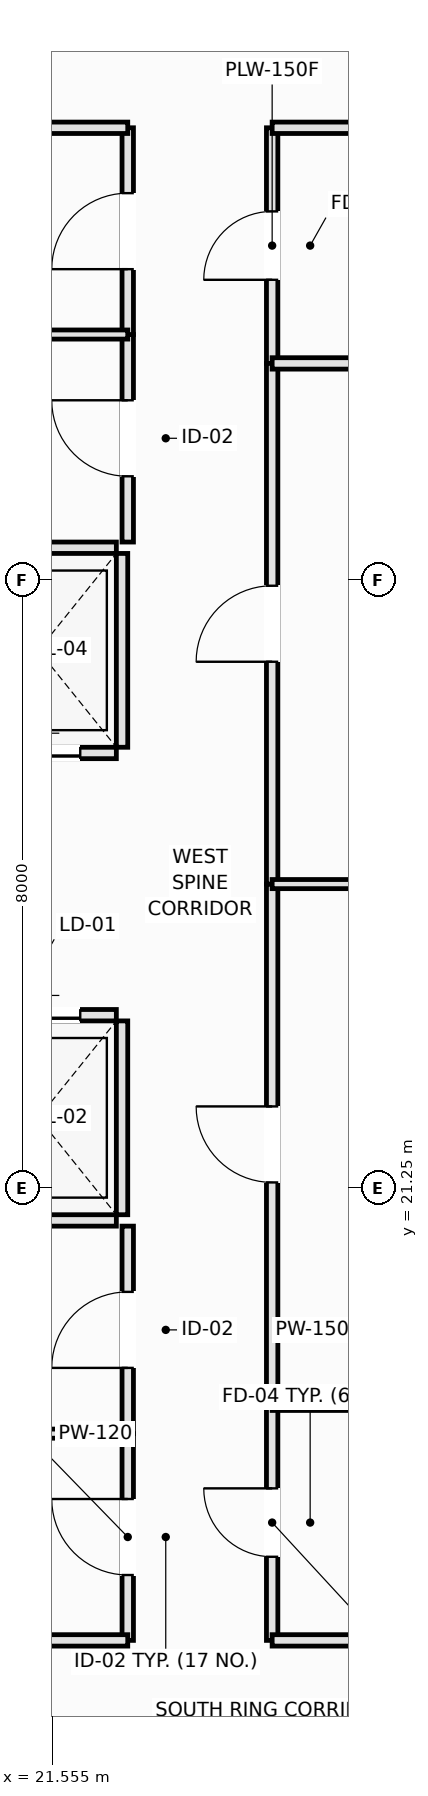
"""IFC4 building model, lengths in metres.
Left out: names, types, materials, properties, quantities, classifications, styles, units other than length and angle.
Written with IfcOpenShell. Run it as: python <this file> out.ifc"""

import sys

from ifc_helpers import new_model, si_unit, direction, frame, frame_2d, origin, place, context, subcontext, project, spatial, rectangle, extrude, element, fill, save


model = new_model("IFC4")
c1 = context("Model", 3, precision=1e-05, world=origin(), true_north=direction((0.0, 1.0)))
c2 = subcontext(c1, "Body", "Model", "MODEL_VIEW")
j1 = project(units=[si_unit("LENGTHUNIT", "METRE"), si_unit("PLANEANGLEUNIT", "RADIAN")], contexts=[c1])
p1 = place(None, origin())
s1 = spatial("IfcSite", under=j1, at=p1, CompositionType="ELEMENT")
p2 = place(p1, origin())
s2 = spatial("IfcBuilding", under=s1, at=p2, CompositionType="ELEMENT")
p3 = place(p2, frame((0.0, 0.0, 46.9)))
s3 = spatial("IfcBuildingStorey", under=s2, at=p3, CompositionType="ELEMENT", Elevation=46.9)
p4 = place(p3, frame((20.35, 20.825, 0.0), z_axis=(0.0, 0.0, 1.0), x_axis=(1.0, 0.0, 0.0)))
e1 = element("IfcWall", 1, at=p4, inside=s3, PredefinedType="PARTITIONING", context=c2, shape_type="SweptSolid", body=[
    extrude(rectangle(XDim=2.05, YDim=0.15, at=frame_2d((1.025, 0.0))), origin(), (0.0, 0.0, 1.0), 3.37),
])
p5 = place(p3, frame((20.35, 23.525, 0.0), z_axis=(0.0, 0.0, 1.0), x_axis=(1.0, 0.0, 0.0)))
e2 = element("IfcWall", 2, at=p5, inside=s3, PredefinedType="PARTITIONING", context=c2, shape_type="SweptSolid", body=[
    extrude(rectangle(XDim=2.05, YDim=0.15, at=frame_2d((1.025, 0.0))), origin(), (0.0, 0.0, 1.0), 3.37),
])
p6 = place(p5, frame((0.475, 0.0, 0.0)))
e3 = element("IfcOpeningElement", 3, at=p6, cuts=e2, PredefinedType="OPENING", context=c2, shape_type="SweptSolid", body=[
    extrude(rectangle(XDim=1.1, YDim=2.2, at=frame_2d((0.55, 1.1))), frame((0.0, 0.085, 0.0), z_axis=(0.0, -1.0, 0.0), x_axis=(1.0, 0.0, 0.0)), (0.0, 0.0, 1.0), 0.17),
])
p7 = place(p3, frame((22.475, 20.9, 0.0), z_axis=(0.0, 0.0, 1.0), x_axis=(0.0, 1.0, 0.0)))
e4 = element("IfcWall", 4, at=p7, inside=s3, PredefinedType="PARTITIONING", context=c2, shape_type="SweptSolid", body=[
    extrude(rectangle(XDim=2.55, YDim=0.15, at=frame_2d((1.275, 0.0))), origin(), (0.0, 0.0, 1.0), 3.37),
])
p8 = place(p3, frame((20.35, 26.975, 0.0), z_axis=(0.0, 0.0, 1.0), x_axis=(1.0, 0.0, 0.0)))
e5 = element("IfcWall", 5, at=p8, inside=s3, PredefinedType="PARTITIONING", context=c2, shape_type="SweptSolid", body=[
    extrude(rectangle(XDim=2.05, YDim=0.15, at=frame_2d((1.025, 0.0))), origin(), (0.0, 0.0, 1.0), 3.37),
])
p9 = place(p8, frame((0.475, 0.0, 0.0)))
e6 = element("IfcOpeningElement", 6, at=p9, cuts=e5, PredefinedType="OPENING", context=c2, shape_type="SweptSolid", body=[
    extrude(rectangle(XDim=1.1, YDim=2.2, at=frame_2d((0.55, 1.1))), frame((0.0, 0.085, 0.0), z_axis=(0.0, -1.0, 0.0), x_axis=(1.0, 0.0, 0.0)), (0.0, 0.0, 1.0), 0.17),
])
p10 = place(p3, frame((20.35, 29.675, 0.0), z_axis=(0.0, 0.0, 1.0), x_axis=(1.0, 0.0, 0.0)))
e7 = element("IfcWall", 7, at=p10, inside=s3, PredefinedType="PARTITIONING", context=c2, shape_type="SweptSolid", body=[
    extrude(rectangle(XDim=2.05, YDim=0.15, at=frame_2d((1.025, 0.0))), origin(), (0.0, 0.0, 1.0), 3.37),
])
p11 = place(p3, frame((22.475, 27.05, 0.0), z_axis=(0.0, 0.0, 1.0), x_axis=(0.0, 1.0, 0.0)))
e8 = element("IfcWall", 8, at=p11, inside=s3, PredefinedType="PARTITIONING", context=c2, shape_type="SweptSolid", body=[
    extrude(rectangle(XDim=2.55, YDim=0.15, at=frame_2d((1.275, 0.0))), origin(), (0.0, 0.0, 1.0), 3.37),
])
p12 = place(p3, frame((22.55, 15.3, 0.0), z_axis=(0.0, 0.0, 1.0), x_axis=(0.0, 1.0, 0.0)))
e9 = element("IfcWall", 9, at=p12, inside=s3, PredefinedType="PARTITIONING", context=c2, shape_type="SweptSolid", body=[
    extrude(rectangle(XDim=2.72, YDim=0.15, at=frame_2d((1.36, 0.0))), origin(), (0.0, 0.0, 1.0), 3.01),
])
p13 = place(p12, frame((0.86, 0.0, 0.0)))
e10 = element("IfcOpeningElement", 10, at=p13, cuts=e9, PredefinedType="OPENING", context=c2, shape_type="SweptSolid", body=[
    extrude(rectangle(XDim=1.0, YDim=2.15, at=frame_2d((0.5, 1.075))), frame((0.0, 0.085, 0.0), z_axis=(0.0, -1.0, 0.0), x_axis=(1.0, 0.0, 0.0)), (0.0, 0.0, 1.0), 0.17),
])
p14 = place(p3, frame((22.55, 18.02, 0.0), z_axis=(0.0, 0.0, 1.0), x_axis=(0.0, 1.0, 0.0)))
e11 = element("IfcWall", 11, at=p14, inside=s3, PredefinedType="PARTITIONING", context=c2, shape_type="SweptSolid", body=[
    extrude(rectangle(XDim=2.73, YDim=0.15, at=frame_2d((1.365, 0.0))), origin(), (0.0, 0.0, 1.0), 3.01),
])
p15 = place(p14, frame((0.865, 0.0, 0.0)))
e12 = element("IfcOpeningElement", 12, at=p15, cuts=e11, PredefinedType="OPENING", context=c2, shape_type="SweptSolid", body=[
    extrude(rectangle(XDim=1.0, YDim=2.15, at=frame_2d((0.5, 1.075))), frame((0.0, 0.085, 0.0), z_axis=(0.0, -1.0, 0.0), x_axis=(1.0, 0.0, 0.0)), (0.0, 0.0, 1.0), 0.17),
])
p16 = place(p3, frame((22.55, 29.75, 0.0), z_axis=(0.0, 0.0, 1.0), x_axis=(0.0, 1.0, 0.0)))
e13 = element("IfcWall", 13, at=p16, inside=s3, PredefinedType="PARTITIONING", context=c2, shape_type="SweptSolid", body=[
    extrude(rectangle(XDim=2.73, YDim=0.15, at=frame_2d((1.365, 0.0))), origin(), (0.0, 0.0, 1.0), 3.01),
])
p17 = place(p16, frame((0.865, 0.0, 0.0)))
e14 = element("IfcOpeningElement", 14, at=p17, cuts=e13, PredefinedType="OPENING", context=c2, shape_type="SweptSolid", body=[
    extrude(rectangle(XDim=1.0, YDim=2.15, at=frame_2d((0.5, 1.075))), frame((0.0, 0.085, 0.0), z_axis=(0.0, -1.0, 0.0), x_axis=(1.0, 0.0, 0.0)), (0.0, 0.0, 1.0), 0.17),
])
p18 = place(p3, frame((22.55, 32.48, 0.0), z_axis=(0.0, 0.0, 1.0), x_axis=(0.0, 1.0, 0.0)))
e15 = element("IfcWall", 15, at=p18, inside=s3, PredefinedType="PARTITIONING", context=c2, shape_type="SweptSolid", body=[
    extrude(rectangle(XDim=2.72, YDim=0.15, at=frame_2d((1.36, 0.0))), origin(), (0.0, 0.0, 1.0), 3.01),
])
p19 = place(p18, frame((0.86, 0.0, 0.0)))
e16 = element("IfcOpeningElement", 16, at=p19, cuts=e15, PredefinedType="OPENING", context=c2, shape_type="SweptSolid", body=[
    extrude(rectangle(XDim=1.0, YDim=2.15, at=frame_2d((0.5, 1.075))), frame((0.0, 0.085, 0.0), z_axis=(0.0, -1.0, 0.0), x_axis=(1.0, 0.0, 0.0)), (0.0, 0.0, 1.0), 0.17),
])
p20 = place(p3, frame((24.45, 15.3, 0.0), z_axis=(0.0, 0.0, 1.0), x_axis=(0.0, 1.0, 0.0)))
e17 = element("IfcWall", 17, at=p20, inside=s3, PredefinedType="PLUMBINGWALL", context=c2, shape_type="SweptSolid", body=[
    extrude(rectangle(XDim=3.1, YDim=0.15, at=frame_2d((1.55, 0.0))), origin(), (0.0, 0.0, 1.0), 3.37),
])
p21 = place(p20, frame((1.1, 0.0, 0.0)))
e18 = element("IfcOpeningElement", 18, at=p21, cuts=e17, PredefinedType="OPENING", context=c2, shape_type="SweptSolid", body=[
    extrude(rectangle(XDim=0.9, YDim=2.1, at=frame_2d((0.45, 1.05))), frame((0.0, 0.085, 0.0), z_axis=(0.0, -1.0, 0.0), x_axis=(1.0, 0.0, 0.0)), (0.0, 0.0, 1.0), 0.17),
])
p22 = place(p3, frame((24.45, 32.1, 0.0), z_axis=(0.0, 0.0, 1.0), x_axis=(0.0, 1.0, 0.0)))
e19 = element("IfcWall", 19, at=p22, inside=s3, PredefinedType="PLUMBINGWALL", context=c2, shape_type="SweptSolid", body=[
    extrude(rectangle(XDim=3.1, YDim=0.15, at=frame_2d((1.55, 0.0))), origin(), (0.0, 0.0, 1.0), 3.37),
])
p23 = place(p22, frame((1.1, 0.0, 0.0)))
e20 = element("IfcOpeningElement", 20, at=p23, cuts=e19, PredefinedType="OPENING", context=c2, shape_type="SweptSolid", body=[
    extrude(rectangle(XDim=0.9, YDim=2.1, at=frame_2d((0.45, 1.05))), frame((0.0, 0.085, 0.0), z_axis=(0.0, -1.0, 0.0), x_axis=(1.0, 0.0, 0.0)), (0.0, 0.0, 1.0), 0.17),
])
p24 = place(p3, frame((24.45, 18.4, 0.0), z_axis=(0.0, 0.0, 1.0), x_axis=(0.0, 1.0, 0.0)))
e21 = element("IfcWall", 21, at=p24, inside=s3, PredefinedType="PARTITIONING", context=c2, shape_type="SweptSolid", body=[
    extrude(rectangle(XDim=6.85, YDim=0.15, at=frame_2d((3.425, 0.0))), origin(), (0.0, 0.0, 1.0), 3.37),
])
p25 = place(p24, frame((2.925, 0.0, 0.0)))
e22 = element("IfcOpeningElement", 22, at=p25, cuts=e21, PredefinedType="OPENING", context=c2, shape_type="SweptSolid", body=[
    extrude(rectangle(XDim=1.0, YDim=2.15, at=frame_2d((0.5, 1.075))), frame((0.0, 0.085, 0.0), z_axis=(0.0, -1.0, 0.0), x_axis=(1.0, 0.0, 0.0)), (0.0, 0.0, 1.0), 0.17),
])
p26 = place(p3, frame((24.45, 25.25, 0.0), z_axis=(0.0, 0.0, 1.0), x_axis=(0.0, 1.0, 0.0)))
e23 = element("IfcWall", 23, at=p26, inside=s3, PredefinedType="PARTITIONING", context=c2, shape_type="SweptSolid", body=[
    extrude(rectangle(XDim=6.85, YDim=0.15, at=frame_2d((3.425, 0.0))), origin(), (0.0, 0.0, 1.0), 3.37),
])
p27 = place(p26, frame((2.925, 0.0, 0.0)))
e24 = element("IfcOpeningElement", 24, at=p27, cuts=e23, PredefinedType="OPENING", context=c2, shape_type="SweptSolid", body=[
    extrude(rectangle(XDim=1.0, YDim=2.15, at=frame_2d((0.5, 1.075))), frame((0.0, 0.085, 0.0), z_axis=(0.0, -1.0, 0.0), x_axis=(1.0, 0.0, 0.0)), (0.0, 0.0, 1.0), 0.17),
])
p28 = place(p3, frame((19.9, 15.3, 0.0), z_axis=(0.0, 0.0, 1.0), x_axis=(1.0, 0.0, 0.0)))
e25 = element("IfcWall", 25, at=p28, inside=s3, PredefinedType="PARTITIONING", context=c2, shape_type="SweptSolid", body=[
    extrude(rectangle(XDim=2.65, YDim=0.15, at=frame_2d((1.325, 0.0))), origin(), (0.0, 0.0, 1.0), 3.37),
])
p29 = place(p3, frame((24.45, 15.3, 0.0), z_axis=(0.0, 0.0, 1.0), x_axis=(1.0, 0.0, 0.0)))
e26 = element("IfcWall", 26, at=p29, inside=s3, PredefinedType="PLUMBINGWALL", context=c2, shape_type="SweptSolid", body=[
    extrude(rectangle(XDim=3.15, YDim=0.15, at=frame_2d((1.575, 0.0))), origin(), (0.0, 0.0, 1.0), 3.37),
])
p30 = place(p3, frame((19.9, 35.2, 0.0), z_axis=(0.0, 0.0, 1.0), x_axis=(1.0, 0.0, 0.0)))
e27 = element("IfcWall", 27, at=p30, inside=s3, PredefinedType="PARTITIONING", context=c2, shape_type="SweptSolid", body=[
    extrude(rectangle(XDim=2.65, YDim=0.15, at=frame_2d((1.325, 0.0))), origin(), (0.0, 0.0, 1.0), 3.37),
])
p31 = place(p3, frame((24.45, 35.2, 0.0), z_axis=(0.0, 0.0, 1.0), x_axis=(1.0, 0.0, 0.0)))
e28 = element("IfcWall", 28, at=p31, inside=s3, PredefinedType="PLUMBINGWALL", context=c2, shape_type="SweptSolid", body=[
    extrude(rectangle(XDim=3.15, YDim=0.15, at=frame_2d((1.575, 0.0))), origin(), (0.0, 0.0, 1.0), 3.37),
])
for number, where, z_axis, x_axis in (
    (29, (19.9, 18.02, 0.0), (0.0, 0.0, 1.0), (1.0, 0.0, 0.0)),
    (30, (19.9, 32.48, 0.0), (0.0, 0.0, 1.0), (1.0, 0.0, 0.0)),
):
    element("IfcWall", number, at=place(p3, frame(where, z_axis=z_axis, x_axis=x_axis)), inside=s3, PredefinedType="PARTITIONING", context=c2, shape_type="SweptSolid", body=[
        extrude(rectangle(XDim=2.65, YDim=0.12, at=frame_2d((1.325, 0.0))), origin(), (0.0, 0.0, 1.0), 3.37),
    ])
for number, where, z_axis, x_axis in (
    (31, (24.45, 18.4, 0.0), (0.0, 0.0, 1.0), (1.0, 0.0, 0.0)),
    (32, (24.45, 32.1, 0.0), (0.0, 0.0, 1.0), (1.0, 0.0, 0.0)),
):
    element("IfcWall", number, at=place(p3, frame(where, z_axis=z_axis, x_axis=x_axis)), inside=s3, PredefinedType="PLUMBINGWALL", context=c2, shape_type="SweptSolid", body=[
        extrude(rectangle(XDim=3.15, YDim=0.15, at=frame_2d((1.575, 0.0))), origin(), (0.0, 0.0, 1.0), 2.72),
    ])
p32 = place(p3, frame((24.45, 25.25, 0.0), z_axis=(0.0, 0.0, 1.0), x_axis=(1.0, 0.0, 0.0)))
e33 = element("IfcWall", 33, at=p32, inside=s3, PredefinedType="PARTITIONING", context=c2, shape_type="SweptSolid", body=[
    extrude(rectangle(XDim=13.75, YDim=0.12, at=frame_2d((6.875, 0.0))), origin(), (0.0, 0.0, 1.0), 2.72),
])
p33 = place(p6, origin())
e34 = element("IfcDoor", 34, at=p33, inside=s3, OperationType="DOUBLE_DOOR_SLIDING", PredefinedType="DOOR", context=c2, shape_type="SweptSolid", body=[
    extrude(rectangle(XDim=1.1, YDim=2.2, at=frame_2d((0.55, 1.1))), frame((0.0, 0.025, 0.0), z_axis=(0.0, -1.0, 0.0), x_axis=(1.0, 0.0, 0.0)), (0.0, 0.0, 1.0), 0.05),
])
fill(e3, e34)
p34 = place(p9, origin())
e35 = element("IfcDoor", 35, at=p34, inside=s3, OperationType="DOUBLE_DOOR_SLIDING", PredefinedType="DOOR", context=c2, shape_type="SweptSolid", body=[
    extrude(rectangle(XDim=1.1, YDim=2.2, at=frame_2d((0.55, 1.1))), frame((0.0, 0.025, 0.0), z_axis=(0.0, -1.0, 0.0), x_axis=(1.0, 0.0, 0.0)), (0.0, 0.0, 1.0), 0.05),
])
fill(e6, e35)
p35 = place(p13, origin())
e36 = element("IfcDoor", 36, at=p35, inside=s3, OperationType="SINGLE_SWING_RIGHT", PredefinedType="DOOR", context=c2, shape_type="SweptSolid", body=[
    extrude(rectangle(XDim=1.0, YDim=2.15, at=frame_2d((0.5, 1.075))), frame((0.0, 0.025, 0.0), z_axis=(0.0, -1.0, 0.0), x_axis=(1.0, 0.0, 0.0)), (0.0, 0.0, 1.0), 0.05),
])
fill(e10, e36)
p36 = place(p15, origin())
e37 = element("IfcDoor", 37, at=p36, inside=s3, OperationType="SINGLE_SWING_LEFT", PredefinedType="DOOR", context=c2, shape_type="SweptSolid", body=[
    extrude(rectangle(XDim=1.0, YDim=2.15, at=frame_2d((0.5, 1.075))), frame((0.0, 0.025, 0.0), z_axis=(0.0, -1.0, 0.0), x_axis=(1.0, 0.0, 0.0)), (0.0, 0.0, 1.0), 0.05),
])
fill(e12, e37)
p37 = place(p17, origin())
e38 = element("IfcDoor", 38, at=p37, inside=s3, OperationType="SINGLE_SWING_RIGHT", PredefinedType="DOOR", context=c2, shape_type="SweptSolid", body=[
    extrude(rectangle(XDim=1.0, YDim=2.15, at=frame_2d((0.5, 1.075))), frame((0.0, 0.025, 0.0), z_axis=(0.0, -1.0, 0.0), x_axis=(1.0, 0.0, 0.0)), (0.0, 0.0, 1.0), 0.05),
])
fill(e14, e38)
p38 = place(p19, origin())
e39 = element("IfcDoor", 39, at=p38, inside=s3, OperationType="SINGLE_SWING_LEFT", PredefinedType="DOOR", context=c2, shape_type="SweptSolid", body=[
    extrude(rectangle(XDim=1.0, YDim=2.15, at=frame_2d((0.5, 1.075))), frame((0.0, 0.025, 0.0), z_axis=(0.0, -1.0, 0.0), x_axis=(1.0, 0.0, 0.0)), (0.0, 0.0, 1.0), 0.05),
])
fill(e16, e39)
p39 = place(p21, origin())
e40 = element("IfcDoor", 40, at=p39, inside=s3, OperationType="SINGLE_SWING_RIGHT", PredefinedType="DOOR", context=c2, shape_type="SweptSolid", body=[
    extrude(rectangle(XDim=0.9, YDim=2.1, at=frame_2d((0.45, 1.05))), frame((0.0, 0.025, 0.0), z_axis=(0.0, -1.0, 0.0), x_axis=(1.0, 0.0, 0.0)), (0.0, 0.0, 1.0), 0.05),
])
fill(e18, e40)
p40 = place(p23, origin())
e41 = element("IfcDoor", 41, at=p40, inside=s3, OperationType="SINGLE_SWING_LEFT", PredefinedType="DOOR", context=c2, shape_type="SweptSolid", body=[
    extrude(rectangle(XDim=0.9, YDim=2.1, at=frame_2d((0.45, 1.05))), frame((0.0, 0.025, 0.0), z_axis=(0.0, -1.0, 0.0), x_axis=(1.0, 0.0, 0.0)), (0.0, 0.0, 1.0), 0.05),
])
fill(e20, e41)
p41 = place(p25, origin())
e42 = element("IfcDoor", 42, at=p41, inside=s3, OperationType="SINGLE_SWING_RIGHT", PredefinedType="DOOR", context=c2, shape_type="SweptSolid", body=[
    extrude(rectangle(XDim=1.0, YDim=2.15, at=frame_2d((0.5, 1.075))), frame((0.0, 0.025, 0.0), z_axis=(0.0, -1.0, 0.0), x_axis=(1.0, 0.0, 0.0)), (0.0, 0.0, 1.0), 0.05),
])
fill(e22, e42)
p42 = place(p27, origin())
e43 = element("IfcDoor", 43, at=p42, inside=s3, OperationType="SINGLE_SWING_LEFT", PredefinedType="DOOR", context=c2, shape_type="SweptSolid", body=[
    extrude(rectangle(XDim=1.0, YDim=2.15, at=frame_2d((0.5, 1.075))), frame((0.0, 0.025, 0.0), z_axis=(0.0, -1.0, 0.0), x_axis=(1.0, 0.0, 0.0)), (0.0, 0.0, 1.0), 0.05),
])
fill(e24, e43)
save(model, sys.argv[1])
